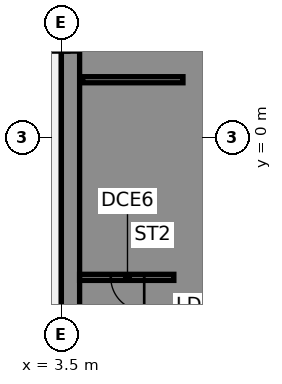
"""IFC4 building model, lengths in metres.
Left out: names, types, materials, properties, quantities, classifications, styles, units other than length and angle.
Written with IfcOpenShell. Run it as: python <this file> out.ifc"""

import sys

from ifc_helpers import new_model, si_unit, direction, frame, frame_2d, origin, place, context, subcontext, project, spatial, polyline, rectangle, outline, extrude, element, fill, save


model = new_model("IFC4")
c1 = context("Model", 3, precision=1e-05, world=origin(), true_north=direction((0.0, 1.0)))
c2 = subcontext(c1, "Body", "Model", "MODEL_VIEW")
j1 = project(units=[si_unit("LENGTHUNIT", "METRE"), si_unit("PLANEANGLEUNIT", "RADIAN")], contexts=[c1])
p1 = place(None, origin())
s1 = spatial("IfcSite", under=j1, at=p1, CompositionType="ELEMENT")
p2 = place(p1, origin())
s2 = spatial("IfcBuilding", under=s1, at=p2, CompositionType="ELEMENT")
p3 = place(p2, frame((0.0, 0.0, 117.25)))
s3 = spatial("IfcBuildingStorey", under=s2, at=p3, CompositionType="ELEMENT", Elevation=117.25)
p4 = place(p3, origin())
e1 = element("IfcWall", 1, at=p4, inside=s3, PredefinedType="SHEAR", context=c2, shape_type="SweptSolid", body=[
    extrude(outline(polyline([(9.8, -5.375), (7.5, -5.375), (7.5, -2.875), (9.8, -2.875), (9.8, -2.625), (7.5, -2.625), (7.5, -0.125), (9.8, -0.125), (9.8, 0.125), (7.5, 0.125), (7.5, 2.625), (9.8, 2.625), (9.8, 2.875), (7.5, 2.875), (7.5, 5.375), (9.8, 5.375), (9.8, 5.625), (7.5, 5.625), (7.5, 8.125), (9.8, 8.125), (9.8, 8.9), (7.5, 8.9), (7.2, 8.9), (7.2, -5.625), (7.5, -5.625), (9.8, -5.625), (9.8, -5.375)])), origin(), (0.0, 0.0, 1.0), 3.61),
])
p5 = place(p3, frame((7.5, 1.9, 0.0), z_axis=(0.0, 0.0, 1.0), x_axis=(-1.0, 0.0, 0.0)))
e2 = element("IfcWall", 2, at=p5, inside=s3, PredefinedType="SHEAR", context=c2, shape_type="SweptSolid", body=[
    extrude(rectangle(XDim=3.3, YDim=0.2, at=frame_2d((1.65, 0.0))), origin(), (0.0, 0.0, 1.0), 3.61),
])
p6 = place(p3, frame((3.8, -8.9, 0.0), z_axis=(0.0, 0.0, 1.0), x_axis=(0.0, 1.0, 0.0)))
e3 = element("IfcWall", 3, at=p6, inside=s3, PredefinedType="SHEAR", context=c2, shape_type="SweptSolid", body=[
    extrude(rectangle(XDim=17.8, YDim=0.6, at=frame_2d((8.9, 0.0))), origin(), (0.0, 0.0, 1.0), 3.61),
])
p7 = place(p6, frame((1.25, 0.0, 0.0)))
e4 = element("IfcOpeningElement", 4, at=p7, cuts=e3, PredefinedType="OPENING", context=c2, shape_type="SweptSolid", body=[
    extrude(rectangle(XDim=1.8, YDim=2.1, at=frame_2d((0.9, 1.05))), frame((0.0, 0.31, 0.0), z_axis=(0.0, -1.0, 0.0), x_axis=(1.0, 0.0, 0.0)), (0.0, 0.0, 1.0), 0.62),
])
p8 = place(p6, frame((11.698, 0.0, 0.0)))
e5 = element("IfcOpeningElement", 5, at=p8, cuts=e3, PredefinedType="OPENING", context=c2, shape_type="SweptSolid", body=[
    extrude(rectangle(XDim=1.0, YDim=2.1, at=frame_2d((0.5, 1.05))), frame((0.0, 0.31, 0.0), z_axis=(0.0, -1.0, 0.0), x_axis=(1.0, 0.0, 0.0)), (0.0, 0.0, 1.0), 0.62),
])
p9 = place(p6, frame((15.222, 0.0, 0.0)))
e6 = element("IfcOpeningElement", 6, at=p9, cuts=e3, PredefinedType="OPENING", context=c2, shape_type="SweptSolid", body=[
    extrude(rectangle(XDim=1.0, YDim=2.1, at=frame_2d((0.5, 1.05))), frame((0.0, 0.31, 0.0), z_axis=(0.0, -1.0, 0.0), x_axis=(1.0, 0.0, 0.0)), (0.0, 0.0, 1.0), 0.62),
])
p10 = place(p3, frame((7.2, -4.6, 0.0), z_axis=(0.0, 0.0, 1.0), x_axis=(-1.0, 0.0, 0.0)))
e7 = element("IfcWall", 7, at=p10, inside=s3, PredefinedType="SHEAR", context=c2, shape_type="SweptSolid", body=[
    extrude(rectangle(XDim=3.1, YDim=0.2, at=frame_2d((1.55, 0.0))), origin(), (0.0, 0.0, 1.0), 3.61),
])
p11 = place(p10, frame((0.975, 0.0, 0.0)))
e8 = element("IfcOpeningElement", 8, at=p11, cuts=e7, PredefinedType="OPENING", context=c2, shape_type="SweptSolid", body=[
    extrude(rectangle(XDim=1.1, YDim=2.1, at=frame_2d((0.55, 1.05))), frame((0.0, 0.11, 0.0), z_axis=(0.0, -1.0, 0.0), x_axis=(1.0, 0.0, 0.0)), (0.0, 0.0, 1.0), 0.22),
])
p12 = place(p8, origin())
e9 = element("IfcDoor", 9, at=p12, inside=s3, OperationType="SINGLE_SWING_LEFT", PredefinedType="DOOR", context=c2, shape_type="SweptSolid", body=[
    extrude(rectangle(XDim=1.0, YDim=2.1, at=frame_2d((0.5, 1.05))), frame((0.0, -0.225, 0.0), z_axis=(0.0, -1.0, 0.0), x_axis=(1.0, 0.0, 0.0)), (0.0, 0.0, 1.0), 0.05),
])
fill(e5, e9)
p13 = place(p11, origin())
e10 = element("IfcDoor", 10, at=p13, inside=s3, OperationType="SINGLE_SWING_LEFT", PredefinedType="DOOR", context=c2, shape_type="SweptSolid", body=[
    extrude(rectangle(XDim=1.1, YDim=2.1, at=frame_2d((0.55, 1.05))), frame((0.0, 0.025, 0.0), z_axis=(0.0, -1.0, 0.0), x_axis=(1.0, 0.0, 0.0)), (0.0, 0.0, 1.0), 0.05),
])
fill(e8, e10)
save(model, sys.argv[1])
